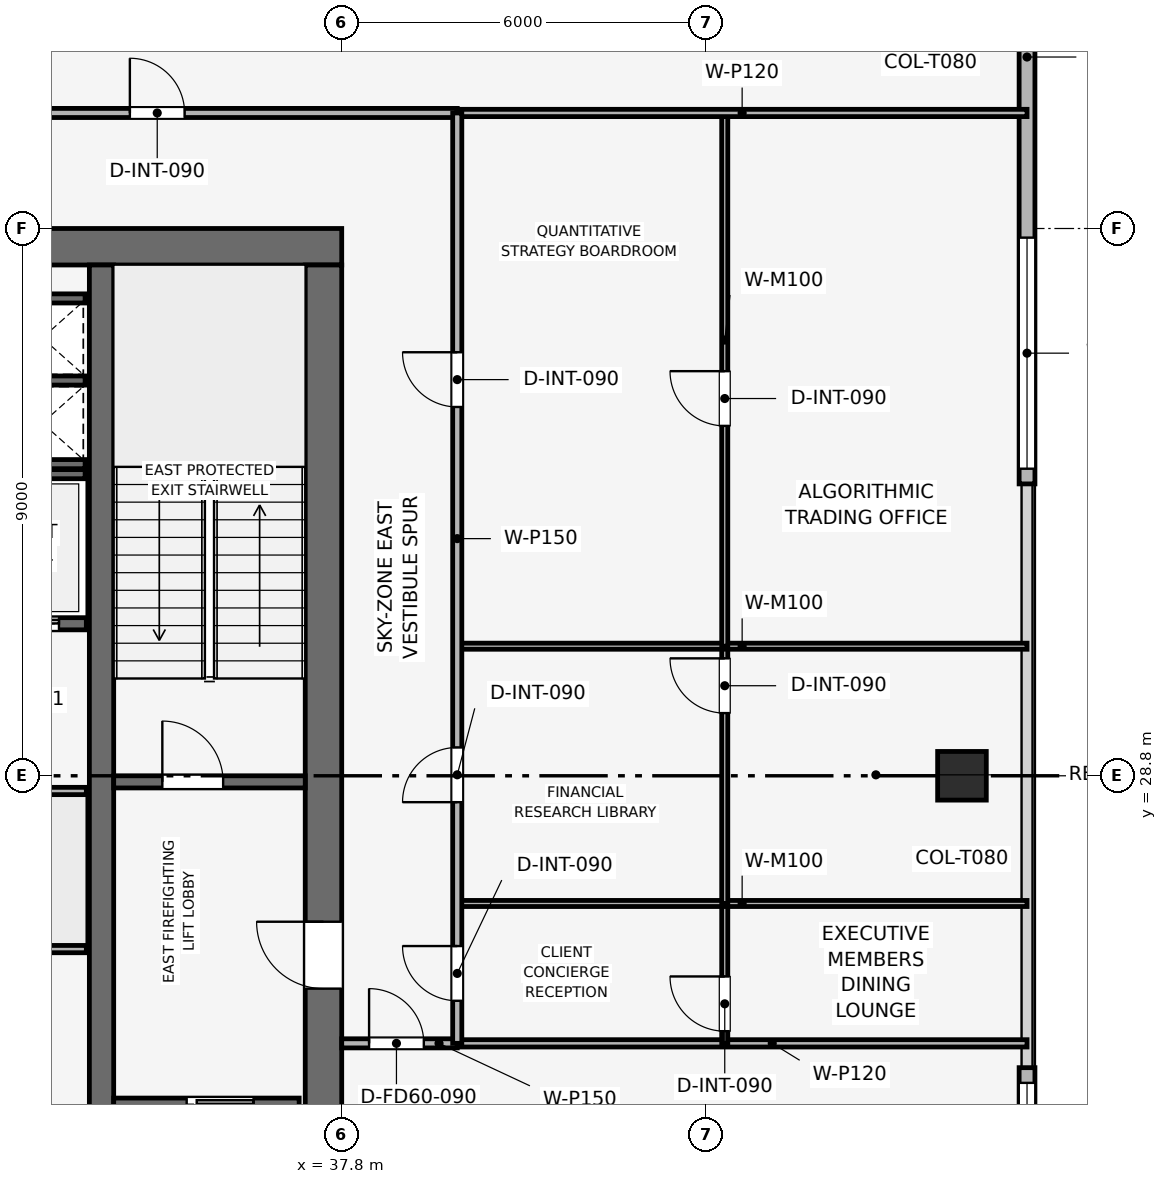
"""IFC4 building model, lengths in metres.
Left out: names, types, materials, properties, quantities, classifications, styles, units other than length and angle.
Written with IfcOpenShell. Run it as: python <this file> out.ifc"""

import sys

from ifc_helpers import new_model, si_unit, direction, frame, frame_2d, origin, origin_2d, place, context, subcontext, project, spatial, rectangle, extrude, element, fill, save


model = new_model("IFC4")
c1 = context("Model", 3, precision=1e-05, world=origin(), true_north=direction((0.0, 1.0)))
c2 = subcontext(c1, "Body", "Model", "MODEL_VIEW")
j1 = project(units=[si_unit("LENGTHUNIT", "METRE"), si_unit("PLANEANGLEUNIT", "RADIAN")], contexts=[c1])
p1 = place(None, origin())
s1 = spatial("IfcSite", under=j1, at=p1, CompositionType="ELEMENT")
p2 = place(p1, origin())
s2 = spatial("IfcBuilding", under=s1, at=p2, CompositionType="ELEMENT")
p3 = place(p2, frame((0.0, 0.0, 360.0)))
s3 = spatial("IfcBuildingStorey", under=s2, at=p3, CompositionType="ELEMENT", Elevation=360.0)
p4 = place(p3, frame((19.8, 37.5, 0.0), z_axis=(0.0, 0.0, 1.0), x_axis=(1.0, 0.0, 0.0)))
e1 = element("IfcWall", 1, at=p4, inside=s3, PredefinedType="SHEAR", context=c2, shape_type="SweptSolid", body=[
    extrude(rectangle(XDim=18.0, YDim=0.6, at=frame_2d((9.0, 0.0))), origin(), (0.0, 0.0, 1.0), 4.5),
])
p5 = place(p4, frame((7.05, 0.0, 0.0)))
e2 = element("IfcOpeningElement", 2, at=p5, cuts=e1, PredefinedType="OPENING", context=c2, shape_type="SweptSolid", body=[
    extrude(rectangle(XDim=1.1, YDim=2.15, at=frame_2d((0.55, 1.075))), frame((0.0, 0.31, 0.0), z_axis=(0.0, -1.0, 0.0), x_axis=(1.0, 0.0, 0.0)), (0.0, 0.0, 1.0), 0.62),
])
p6 = place(p3, frame((37.5, 20.4, 0.0), z_axis=(0.0, 0.0, 1.0), x_axis=(0.0, 1.0, 0.0)))
e3 = element("IfcWall", 3, at=p6, inside=s3, PredefinedType="SHEAR", context=c2, shape_type="SweptSolid", body=[
    extrude(rectangle(XDim=16.8, YDim=0.6, at=frame_2d((8.4, 0.0))), origin(), (0.0, 0.0, 1.0), 4.5),
])
p7 = place(p6, frame((4.9, 0.0, 0.0)))
e4 = element("IfcOpeningElement", 4, at=p7, cuts=e3, PredefinedType="OPENING", context=c2, shape_type="SweptSolid", body=[
    extrude(rectangle(XDim=1.1, YDim=2.15, at=frame_2d((0.55, 1.075))), frame((0.0, 0.31, 0.0), z_axis=(0.0, -1.0, 0.0), x_axis=(1.0, 0.0, 0.0)), (0.0, 0.0, 1.0), 0.62),
])
p8 = place(p3, frame((33.85, 20.4, 0.0), z_axis=(0.0, 0.0, 1.0), x_axis=(0.0, 1.0, 0.0)))
e5 = element("IfcWall", 5, at=p8, inside=s3, PredefinedType="SHEAR", context=c2, shape_type="SweptSolid", body=[
    extrude(rectangle(XDim=16.8, YDim=0.4, at=frame_2d((8.4, 0.0))), origin(), (0.0, 0.0, 1.0), 4.5),
])
p9 = place(p3, frame((48.0, 28.8, 0.003), z_axis=(0.0, 0.0, 1.0), x_axis=(1.0, 0.0, 0.0)))
e6 = element("IfcColumn", 6, at=p9, inside=s3, PredefinedType="COLUMN", context=c2, shape_type="SweptSolid", body=[
    extrude(rectangle(XDim=0.8, YDim=0.8, at=origin_2d()), origin(), (0.0, 0.0, 1.0), 4.234),
])
p10 = place(p3, frame((49.07, 43.6, 0.0), z_axis=(0.0, 0.0, 1.0), x_axis=(0.0, -1.0, 0.0)))
e7 = element("IfcWall", 7, at=p10, inside=s3, PredefinedType="SOLIDWALL", context=c2, shape_type="SweptSolid", body=[
    extrude(rectangle(XDim=10.0, YDim=0.26, at=frame_2d((5.0, 0.0))), origin(), (0.0, 0.0, 1.0), 4.24),
])
p11 = place(p10, frame((5.95, 0.0, 0.9)))
e8 = element("IfcOpeningElement", 8, at=p11, cuts=e7, PredefinedType="OPENING", context=c2, shape_type="SweptSolid", body=[
    extrude(rectangle(XDim=3.8, YDim=1.9, at=frame_2d((1.9, 0.95))), frame((0.0, 0.14, 0.0), z_axis=(0.0, -1.0, 0.0), x_axis=(1.0, 0.0, 0.0)), (0.0, 0.0, 1.0), 0.28),
])
p12 = place(p3, frame((49.07, 24.0, 0.0), z_axis=(0.0, 0.0, 1.0), x_axis=(0.0, -1.0, 0.0)))
e9 = element("IfcWall", 9, at=p12, inside=s3, PredefinedType="SOLIDWALL", context=c2, shape_type="SweptSolid", body=[
    extrude(rectangle(XDim=10.0, YDim=0.26, at=frame_2d((5.0, 0.0))), origin(), (0.0, 0.0, 1.0), 4.24),
])
p13 = place(p12, frame((0.25, 0.0, 0.9)))
e10 = element("IfcOpeningElement", 10, at=p13, cuts=e9, PredefinedType="OPENING", context=c2, shape_type="SweptSolid", body=[
    extrude(rectangle(XDim=1.2, YDim=2.1, at=frame_2d((0.6, 1.05))), frame((0.0, 0.14, 0.0), z_axis=(0.0, -1.0, 0.0), x_axis=(1.0, 0.0, 0.0)), (0.0, 0.0, 1.0), 0.28),
])
p14 = place(p3, frame((34.05, 28.7, 0.0), z_axis=(0.0, 0.0, 1.0), x_axis=(1.0, 0.0, 0.0)))
e11 = element("IfcWall", 11, at=p14, inside=s3, PredefinedType="SHEAR", context=c2, shape_type="SweptSolid", body=[
    extrude(rectangle(XDim=3.15, YDim=0.2, at=frame_2d((1.575, 0.0))), origin(), (0.0, 0.0, 1.0), 4.24),
])
p15 = place(p14, frame((0.8, 0.0, 0.0)))
e12 = element("IfcOpeningElement", 12, at=p15, cuts=e11, PredefinedType="OPENING", context=c2, shape_type="SweptSolid", body=[
    extrude(rectangle(XDim=1.0, YDim=2.1, at=frame_2d((0.5, 1.05))), frame((0.0, 0.11, 0.0), z_axis=(0.0, -1.0, 0.0), x_axis=(1.0, 0.0, 0.0)), (0.0, 0.0, 1.0), 0.22),
])
for number, where, z_axis, x_axis in (
    (13, (32.25, 33.925, 0.0), (0.0, 0.0, 1.0), (1.0, 0.0, 0.0)),
    (14, (32.25, 35.3, 0.0), (0.0, 0.0, 1.0), (1.0, 0.0, 0.0)),
):
    element("IfcWall", number, at=place(p3, frame(where, z_axis=z_axis, x_axis=x_axis)), inside=s3, PredefinedType="SHEAR", context=c2, shape_type="SweptSolid", body=[
        extrude(rectangle(XDim=1.33, YDim=0.15, at=frame_2d((0.665, 0.0))), origin(), (0.0, 0.0, 1.0), 4.24),
    ])
p16 = place(p3, frame((34.05, 23.4, 0.0), z_axis=(0.0, 0.0, 1.0), x_axis=(1.0, 0.0, 0.0)))
e15 = element("IfcWall", 15, at=p16, inside=s3, PredefinedType="SHEAR", context=c2, shape_type="SweptSolid", body=[
    extrude(rectangle(XDim=3.05, YDim=0.2, at=frame_2d((1.525, 0.0))), origin(), (0.0, 0.0, 1.0), 4.24),
])
p17 = place(p16, frame((1.2, 0.0, 0.0)))
e16 = element("IfcOpeningElement", 16, at=p17, cuts=e15, PredefinedType="OPENING", context=c2, shape_type="SweptSolid", body=[
    extrude(rectangle(XDim=1.1, YDim=2.15, at=frame_2d((0.55, 1.075))), frame((0.0, 0.11, 0.0), z_axis=(0.0, -1.0, 0.0), x_axis=(1.0, 0.0, 0.0)), (0.0, 0.0, 1.0), 0.22),
])
p18 = place(p3, frame((31.6, 31.3, 0.0), z_axis=(0.0, 0.0, 1.0), x_axis=(1.0, 0.0, 0.0)))
e17 = element("IfcWall", 17, at=p18, inside=s3, PredefinedType="SHEAR", context=c2, shape_type="SweptSolid", body=[
    extrude(rectangle(XDim=2.0, YDim=0.2, at=frame_2d((1.0, 0.0))), origin(), (0.0, 0.0, 1.0), 4.24),
])
p19 = place(p18, frame((0.45, 0.0, 0.0)))
e18 = element("IfcOpeningElement", 18, at=p19, cuts=e17, PredefinedType="OPENING", context=c2, shape_type="SweptSolid", body=[
    extrude(rectangle(XDim=1.1, YDim=2.15, at=frame_2d((0.55, 1.075))), frame((0.0, 0.11, 0.0), z_axis=(0.0, -1.0, 0.0), x_axis=(1.0, 0.0, 0.0)), (0.0, 0.0, 1.0), 0.22),
])
p20 = place(p3, frame((32.25, 36.65, 0.0), z_axis=(0.0, 0.0, 1.0), x_axis=(1.0, 0.0, 0.0)))
e19 = element("IfcWall", 19, at=p20, inside=s3, PredefinedType="SHEAR", context=c2, shape_type="SweptSolid", body=[
    extrude(rectangle(XDim=1.33, YDim=0.15, at=frame_2d((0.665, 0.0))), origin(), (0.0, 0.0, 1.0), 4.24),
])
p21 = place(p3, frame((29.5, 33.76, 0.0), z_axis=(0.0, 0.0, 1.0), x_axis=(1.0, 0.0, 0.0)))
e20 = element("IfcWall", 20, at=p21, inside=s3, PredefinedType="SHEAR", context=c2, shape_type="SweptSolid", body=[
    extrude(rectangle(XDim=4.08, YDim=0.15, at=frame_2d((2.04, 0.0))), origin(), (0.0, 0.0, 1.0), 4.24),
])
p22 = place(p3, frame((29.55, 25.95, 0.0), z_axis=(0.0, 0.0, 1.0), x_axis=(1.0, 0.0, 0.0)))
e21 = element("IfcWall", 21, at=p22, inside=s3, PredefinedType="PARTITIONING", context=c2, shape_type="SweptSolid", body=[
    extrude(rectangle(XDim=4.05, YDim=0.12, at=frame_2d((2.025, 0.0))), origin(), (0.0, 0.0, 1.0), 4.24),
])
p23 = place(p22, frame((1.575, 0.0, 0.0)))
e22 = element("IfcOpeningElement", 22, at=p23, cuts=e21, PredefinedType="OPENING", context=c2, shape_type="SweptSolid", body=[
    extrude(rectangle(XDim=0.9, YDim=2.1, at=frame_2d((0.45, 1.05))), frame((0.0, 0.07, 0.0), z_axis=(0.0, -1.0, 0.0), x_axis=(1.0, 0.0, 0.0)), (0.0, 0.0, 1.0), 0.14),
])
p24 = place(p3, frame((29.55, 28.55, 0.0), z_axis=(0.0, 0.0, 1.0), x_axis=(1.0, 0.0, 0.0)))
e23 = element("IfcWall", 23, at=p24, inside=s3, PredefinedType="PARTITIONING", context=c2, shape_type="SweptSolid", body=[
    extrude(rectangle(XDim=4.05, YDim=0.12, at=frame_2d((2.025, 0.0))), origin(), (0.0, 0.0, 1.0), 4.24),
])
p25 = place(p3, frame((37.8, 24.4, 0.0), z_axis=(0.0, 0.0, 1.0), x_axis=(1.0, 0.0, 0.0)))
e24 = element("IfcWall", 24, at=p25, inside=s3, PredefinedType="PARTITIONING", context=c2, shape_type="SweptSolid", body=[
    extrude(rectangle(XDim=1.9, YDim=0.15, at=frame_2d((0.95, 0.0))), origin(), (0.0, 0.0, 1.0), 4.24),
])
p26 = place(p25, frame((0.45, 0.0, 0.0)))
e25 = element("IfcOpeningElement", 25, at=p26, cuts=e24, PredefinedType="OPENING", context=c2, shape_type="SweptSolid", body=[
    extrude(rectangle(XDim=0.9, YDim=2.1, at=frame_2d((0.45, 1.05))), frame((0.0, 0.085, 0.0), z_axis=(0.0, -1.0, 0.0), x_axis=(1.0, 0.0, 0.0)), (0.0, 0.0, 1.0), 0.17),
])
p27 = place(p3, frame((39.7, 24.4, 0.0), z_axis=(0.0, 0.0, 1.0), x_axis=(1.0, 0.0, 0.0)))
e26 = element("IfcWall", 26, at=p27, inside=s3, PredefinedType="PARTITIONING", context=c2, shape_type="SweptSolid", body=[
    extrude(rectangle(XDim=9.37, YDim=0.12, at=frame_2d((4.685, 0.0))), origin(), (0.0, 0.0, 1.0), 3.865),
])
p28 = place(p3, frame((44.099, 24.4, 0.0), z_axis=(0.0, 0.0, 1.0), x_axis=(0.0, 1.0, 0.0)))
e27 = element("IfcWall", 27, at=p28, inside=s3, PredefinedType="MOVABLE", context=c2, shape_type="SweptSolid", body=[
    extrude(rectangle(XDim=2.3, YDim=0.1, at=frame_2d((1.15, 0.0))), origin(), (0.0, 0.0, 1.0), 4.24),
])
p29 = place(p28, frame((0.2, 0.0, 0.0)))
e28 = element("IfcOpeningElement", 28, at=p29, cuts=e27, PredefinedType="OPENING", context=c2, shape_type="SweptSolid", body=[
    extrude(rectangle(XDim=0.9, YDim=2.1, at=frame_2d((0.45, 1.05))), frame((0.0, 0.06, 0.0), z_axis=(0.0, -1.0, 0.0), x_axis=(1.0, 0.0, 0.0)), (0.0, 0.0, 1.0), 0.12),
])
p30 = place(p3, frame((39.7, 26.7, 0.0), z_axis=(0.0, 0.0, 1.0), x_axis=(1.0, 0.0, 0.0)))
e29 = element("IfcWall", 29, at=p30, inside=s3, PredefinedType="MOVABLE", context=c2, shape_type="SweptSolid", body=[
    extrude(rectangle(XDim=9.37, YDim=0.1, at=frame_2d((4.685, 0.0))), origin(), (0.0, 0.0, 1.0), 3.865),
])
p31 = place(p3, frame((44.099, 26.7, 0.0), z_axis=(0.0, 0.0, 1.0), x_axis=(0.0, 1.0, 0.0)))
e30 = element("IfcWall", 30, at=p31, inside=s3, PredefinedType="MOVABLE", context=c2, shape_type="SweptSolid", body=[
    extrude(rectangle(XDim=4.231, YDim=0.1, at=frame_2d((2.115, 0.0))), origin(), (0.0, 0.0, 1.0), 3.825),
])
p32 = place(p31, frame((3.131, 0.0, 0.0)))
e31 = element("IfcOpeningElement", 31, at=p32, cuts=e30, PredefinedType="OPENING", context=c2, shape_type="SweptSolid", body=[
    extrude(rectangle(XDim=0.9, YDim=2.1, at=frame_2d((0.45, 1.05))), frame((0.0, 0.06, 0.0), z_axis=(0.0, -1.0, 0.0), x_axis=(1.0, 0.0, 0.0)), (0.0, 0.0, 1.0), 0.12),
])
p33 = place(p3, frame((39.7, 30.931, 0.0), z_axis=(0.0, 0.0, 1.0), x_axis=(1.0, 0.0, 0.0)))
e32 = element("IfcWall", 32, at=p33, inside=s3, PredefinedType="MOVABLE", context=c2, shape_type="SweptSolid", body=[
    extrude(rectangle(XDim=9.37, YDim=0.1, at=frame_2d((4.685, 0.0))), origin(), (0.0, 0.0, 1.0), 3.865),
])
p34 = place(p3, frame((44.099, 30.931, 0.0), z_axis=(0.0, 0.0, 1.0), x_axis=(0.0, 1.0, 0.0)))
e33 = element("IfcWall", 33, at=p34, inside=s3, PredefinedType="MOVABLE", context=c2, shape_type="SweptSolid", body=[
    extrude(rectangle(XDim=8.769, YDim=0.1, at=frame_2d((4.385, 0.0))), origin(), (0.0, 0.0, 1.0), 3.825),
])
p35 = place(p34, frame((3.623, 0.0, 0.0)))
e34 = element("IfcOpeningElement", 34, at=p35, cuts=e33, PredefinedType="OPENING", context=c2, shape_type="SweptSolid", body=[
    extrude(rectangle(XDim=0.9, YDim=2.1, at=frame_2d((0.45, 1.05))), frame((0.0, 0.06, 0.0), z_axis=(0.0, -1.0, 0.0), x_axis=(1.0, 0.0, 0.0)), (0.0, 0.0, 1.0), 0.12),
])
p36 = place(p3, frame((39.7, 39.7, 0.0), z_axis=(0.0, 0.0, 1.0), x_axis=(1.0, 0.0, 0.0)))
e35 = element("IfcWall", 35, at=p36, inside=s3, PredefinedType="PARTITIONING", context=c2, shape_type="SweptSolid", body=[
    extrude(rectangle(XDim=9.37, YDim=0.12, at=frame_2d((4.685, 0.0))), origin(), (0.0, 0.0, 1.0), 3.825),
])
p37 = place(p3, frame((17.9, 39.7, 0.0), z_axis=(0.0, 0.0, 1.0), x_axis=(1.0, 0.0, 0.0)))
e36 = element("IfcWall", 36, at=p37, inside=s3, PredefinedType="PARTITIONING", context=c2, shape_type="SweptSolid", body=[
    extrude(rectangle(XDim=21.8, YDim=0.15, at=frame_2d((10.9, 0.0))), origin(), (0.0, 0.0, 1.0), 3.825),
])
p38 = place(p37, frame((5.516, 0.0, 0.0)))
e37 = element("IfcOpeningElement", 37, at=p38, cuts=e36, PredefinedType="OPENING", context=c2, shape_type="SweptSolid", body=[
    extrude(rectangle(XDim=0.9, YDim=2.1, at=frame_2d((0.45, 1.05))), frame((0.0, 0.085, 0.0), z_axis=(0.0, -1.0, 0.0), x_axis=(1.0, 0.0, 0.0)), (0.0, 0.0, 1.0), 0.17),
])
p39 = place(p37, frame((16.416, 0.0, 0.0)))
e38 = element("IfcOpeningElement", 38, at=p39, cuts=e36, PredefinedType="OPENING", context=c2, shape_type="SweptSolid", body=[
    extrude(rectangle(XDim=0.9, YDim=2.1, at=frame_2d((0.45, 1.05))), frame((0.0, 0.085, 0.0), z_axis=(0.0, -1.0, 0.0), x_axis=(1.0, 0.0, 0.0)), (0.0, 0.0, 1.0), 0.17),
])
p40 = place(p3, frame((39.7, 24.4, 0.0), z_axis=(0.0, 0.0, 1.0), x_axis=(0.0, 1.0, 0.0)))
e39 = element("IfcWall", 39, at=p40, inside=s3, PredefinedType="PARTITIONING", context=c2, shape_type="SweptSolid", body=[
    extrude(rectangle(XDim=15.3, YDim=0.15, at=frame_2d((7.65, 0.0))), origin(), (0.0, 0.0, 1.0), 3.825),
])
p41 = place(p40, frame((0.7, 0.0, 0.0)))
e40 = element("IfcOpeningElement", 40, at=p41, cuts=e39, PredefinedType="OPENING", context=c2, shape_type="SweptSolid", body=[
    extrude(rectangle(XDim=0.9, YDim=2.1, at=frame_2d((0.45, 1.05))), frame((0.0, 0.085, 0.0), z_axis=(0.0, -1.0, 0.0), x_axis=(1.0, 0.0, 0.0)), (0.0, 0.0, 1.0), 0.17),
])
p42 = place(p40, frame((3.966, 0.0, 0.0)))
e41 = element("IfcOpeningElement", 41, at=p42, cuts=e39, PredefinedType="OPENING", context=c2, shape_type="SweptSolid", body=[
    extrude(rectangle(XDim=0.9, YDim=2.1, at=frame_2d((0.45, 1.05))), frame((0.0, 0.085, 0.0), z_axis=(0.0, -1.0, 0.0), x_axis=(1.0, 0.0, 0.0)), (0.0, 0.0, 1.0), 0.17),
])
p43 = place(p40, frame((10.465, 0.0, 0.0)))
e42 = element("IfcOpeningElement", 42, at=p43, cuts=e39, PredefinedType="OPENING", context=c2, shape_type="SweptSolid", body=[
    extrude(rectangle(XDim=0.9, YDim=2.1, at=frame_2d((0.45, 1.05))), frame((0.0, 0.085, 0.0), z_axis=(0.0, -1.0, 0.0), x_axis=(1.0, 0.0, 0.0)), (0.0, 0.0, 1.0), 0.17),
])
p44 = place(p11, origin())
e43 = element("IfcWindow", 43, at=p44, inside=s3, PartitioningType="SINGLE_PANEL", PredefinedType="WINDOW", context=c2, shape_type="SweptSolid", body=[
    extrude(rectangle(XDim=3.8, YDim=1.9, at=frame_2d((1.9, 0.95))), frame((0.0, 0.03, 0.0), z_axis=(0.0, -1.0, 0.0), x_axis=(1.0, 0.0, 0.0)), (0.0, 0.0, 1.0), 0.06),
])
fill(e8, e43)
p45 = place(p13, origin())
e44 = element("IfcWindow", 44, at=p45, inside=s3, PartitioningType="SINGLE_PANEL", PredefinedType="WINDOW", context=c2, shape_type="SweptSolid", body=[
    extrude(rectangle(XDim=1.2, YDim=2.1, at=frame_2d((0.6, 1.05))), frame((0.0, 0.03, 0.0), z_axis=(0.0, -1.0, 0.0), x_axis=(1.0, 0.0, 0.0)), (0.0, 0.0, 1.0), 0.06),
])
fill(e10, e44)
p46 = place(p15, origin())
e45 = element("IfcDoor", 45, at=p46, inside=s3, OperationType="SINGLE_SWING_LEFT", PredefinedType="DOOR", context=c2, shape_type="SweptSolid", body=[
    extrude(rectangle(XDim=1.0, YDim=2.1, at=frame_2d((0.5, 1.05))), frame((0.0, 0.025, 0.0), z_axis=(0.0, -1.0, 0.0), x_axis=(1.0, 0.0, 0.0)), (0.0, 0.0, 1.0), 0.05),
])
fill(e12, e45)
p47 = place(p17, origin())
e46 = element("IfcDoor", 46, at=p47, inside=s3, OperationType="SLIDING_TO_RIGHT", PredefinedType="DOOR", context=c2, shape_type="SweptSolid", body=[
    extrude(rectangle(XDim=1.1, YDim=2.15, at=frame_2d((0.55, 1.075))), frame((0.0, 0.025, 0.0), z_axis=(0.0, -1.0, 0.0), x_axis=(1.0, 0.0, 0.0)), (0.0, 0.0, 1.0), 0.05),
])
fill(e16, e46)
p48 = place(p19, origin())
e47 = element("IfcDoor", 47, at=p48, inside=s3, OperationType="SLIDING_TO_RIGHT", PredefinedType="DOOR", context=c2, shape_type="SweptSolid", body=[
    extrude(rectangle(XDim=1.1, YDim=2.15, at=frame_2d((0.55, 1.075))), frame((0.0, 0.025, 0.0), z_axis=(0.0, -1.0, 0.0), x_axis=(1.0, 0.0, 0.0)), (0.0, 0.0, 1.0), 0.05),
])
fill(e18, e47)
p49 = place(p26, origin())
e48 = element("IfcDoor", 48, at=p49, inside=s3, OperationType="SINGLE_SWING_LEFT", PredefinedType="DOOR", context=c2, shape_type="SweptSolid", body=[
    extrude(rectangle(XDim=0.9, YDim=2.1, at=frame_2d((0.45, 1.05))), frame((0.0, 0.025, 0.0), z_axis=(0.0, -1.0, 0.0), x_axis=(1.0, 0.0, 0.0)), (0.0, 0.0, 1.0), 0.05),
])
fill(e25, e48)
p50 = place(p29, origin())
e49 = element("IfcDoor", 49, at=p50, inside=s3, OperationType="SINGLE_SWING_RIGHT", PredefinedType="DOOR", context=c2, shape_type="SweptSolid", body=[
    extrude(rectangle(XDim=0.9, YDim=2.1, at=frame_2d((0.45, 1.05))), frame((0.0, 0.025, 0.0), z_axis=(0.0, -1.0, 0.0), x_axis=(1.0, 0.0, 0.0)), (0.0, 0.0, 1.0), 0.05),
])
fill(e28, e49)
p51 = place(p32, origin())
e50 = element("IfcDoor", 50, at=p51, inside=s3, OperationType="SINGLE_SWING_RIGHT", PredefinedType="DOOR", context=c2, shape_type="SweptSolid", body=[
    extrude(rectangle(XDim=0.9, YDim=2.1, at=frame_2d((0.45, 1.05))), frame((0.0, 0.025, 0.0), z_axis=(0.0, -1.0, 0.0), x_axis=(1.0, 0.0, 0.0)), (0.0, 0.0, 1.0), 0.05),
])
fill(e31, e50)
p52 = place(p35, origin())
e51 = element("IfcDoor", 51, at=p52, inside=s3, OperationType="SINGLE_SWING_RIGHT", PredefinedType="DOOR", context=c2, shape_type="SweptSolid", body=[
    extrude(rectangle(XDim=0.9, YDim=2.1, at=frame_2d((0.45, 1.05))), frame((0.0, 0.025, 0.0), z_axis=(0.0, -1.0, 0.0), x_axis=(1.0, 0.0, 0.0)), (0.0, 0.0, 1.0), 0.05),
])
fill(e34, e51)
p53 = place(p39, origin())
e52 = element("IfcDoor", 52, at=p53, inside=s3, OperationType="SINGLE_SWING_LEFT", PredefinedType="DOOR", context=c2, shape_type="SweptSolid", body=[
    extrude(rectangle(XDim=0.9, YDim=2.1, at=frame_2d((0.45, 1.05))), frame((0.0, 0.025, 0.0), z_axis=(0.0, -1.0, 0.0), x_axis=(1.0, 0.0, 0.0)), (0.0, 0.0, 1.0), 0.05),
])
fill(e38, e52)
p54 = place(p41, origin())
e53 = element("IfcDoor", 53, at=p54, inside=s3, OperationType="SINGLE_SWING_RIGHT", PredefinedType="DOOR", context=c2, shape_type="SweptSolid", body=[
    extrude(rectangle(XDim=0.9, YDim=2.1, at=frame_2d((0.45, 1.05))), frame((0.0, 0.025, 0.0), z_axis=(0.0, -1.0, 0.0), x_axis=(1.0, 0.0, 0.0)), (0.0, 0.0, 1.0), 0.05),
])
fill(e40, e53)
p55 = place(p42, origin())
e54 = element("IfcDoor", 54, at=p55, inside=s3, OperationType="SINGLE_SWING_LEFT", PredefinedType="DOOR", context=c2, shape_type="SweptSolid", body=[
    extrude(rectangle(XDim=0.9, YDim=2.1, at=frame_2d((0.45, 1.05))), frame((0.0, 0.025, 0.0), z_axis=(0.0, -1.0, 0.0), x_axis=(1.0, 0.0, 0.0)), (0.0, 0.0, 1.0), 0.05),
])
fill(e41, e54)
p56 = place(p43, origin())
e55 = element("IfcDoor", 55, at=p56, inside=s3, OperationType="SINGLE_SWING_RIGHT", PredefinedType="DOOR", context=c2, shape_type="SweptSolid", body=[
    extrude(rectangle(XDim=0.9, YDim=2.1, at=frame_2d((0.45, 1.05))), frame((0.0, 0.025, 0.0), z_axis=(0.0, -1.0, 0.0), x_axis=(1.0, 0.0, 0.0)), (0.0, 0.0, 1.0), 0.05),
])
fill(e42, e55)
p57 = place(p7, origin())
e56 = element("IfcDoor", 56, at=p57, inside=s3, OperationType="SINGLE_SWING_RIGHT", PredefinedType="DOOR", context=c2, shape_type="SweptSolid", body=[
    extrude(rectangle(XDim=1.1, YDim=2.15, at=frame_2d((0.55, 1.075))), frame((0.0, 0.025, 0.0), z_axis=(0.0, -1.0, 0.0), x_axis=(1.0, 0.0, 0.0)), (0.0, 0.0, 1.0), 0.05),
])
fill(e4, e56)
save(model, sys.argv[1])
